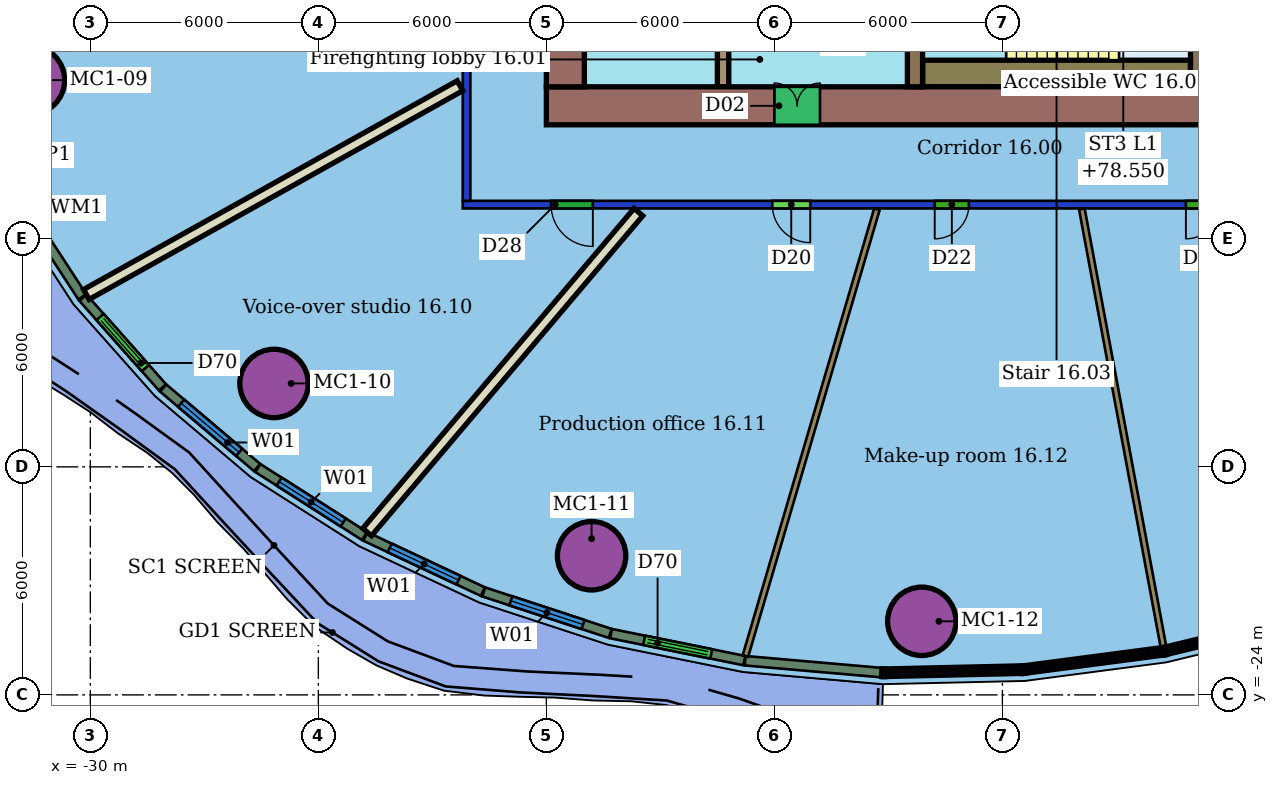
"""IFC4 building model, lengths in metres.
Left out: names, types, materials, properties, quantities, classifications, styles, units other than length and angle.
Written with IfcOpenShell. Run it as: python <this file> out.ifc"""

import sys

from ifc_helpers import new_model, si_unit, direction, frame, frame_2d, origin, origin_2d, place, context, subcontext, project, spatial, rectangle, hollow_circle, extrude, element, fill, save


model = new_model("IFC4")
c1 = context("Model", 3, precision=1e-05, world=origin(), true_north=direction((0.0, 1.0)))
c2 = subcontext(c1, "Body", "Model", "MODEL_VIEW")
j1 = project(units=[si_unit("LENGTHUNIT", "METRE"), si_unit("PLANEANGLEUNIT", "RADIAN")], contexts=[c1])
p1 = place(None, origin())
s1 = spatial("IfcSite", under=j1, at=p1, CompositionType="ELEMENT")
p2 = place(p1, origin())
s2 = spatial("IfcBuilding", under=s1, at=p2, CompositionType="ELEMENT")
p3 = place(p2, frame((0.0, 0.0, 76.7)))
s3 = spatial("IfcBuildingStorey", under=s2, at=p3, CompositionType="ELEMENT", Elevation=76.7)
for number, where, z_axis, x_axis in (
    (1, (-31.575, -7.824, 0.0), (0.0, 0.0, 1.0), (1.0, 0.0, 0.0)),
    (2, (-25.166, -15.805, 0.0), (0.0, 0.0, 1.0), (1.0, 0.0, 0.0)),
    (3, (-16.81, -20.339, 0.0), (0.0, 0.0, 1.0), (1.0, 0.0, 0.0)),
    (4, (-8.121, -22.064, 0.0), (0.0, 0.0, 1.0), (1.0, 0.0, 0.0)),
):
    element("IfcColumn", number, at=place(p3, frame(where, z_axis=z_axis, x_axis=x_axis)), inside=s3, PredefinedType="COLUMN", context=c2, shape_type="SweptSolid", body=[
        extrude(hollow_circle(Radius=0.9, WallThickness=0.06, at=origin_2d()), origin(), (0.0, 0.0, 1.0), 3.55),
    ])
p4 = place(p3, frame((8.2, -11.1, 0.0), z_axis=(0.0, 0.0, 1.0), x_axis=(-1.0, 0.0, 0.0)))
e5 = element("IfcWall", 5, at=p4, inside=s3, PredefinedType="PARTITIONING", context=c2, shape_type="SweptSolid", body=[
    extrude(rectangle(XDim=28.4, YDim=0.2, at=frame_2d((14.2, 0.0))), origin(), (0.0, 0.0, 1.0), 2.85),
])
p5 = place(p4, frame((24.977, 0.0, 0.0)))
e6 = element("IfcOpeningElement", 6, at=p5, cuts=e5, PredefinedType="OPENING", context=c2, shape_type="SweptSolid", body=[
    extrude(rectangle(XDim=1.1, YDim=2.1, at=frame_2d((0.55, 1.05))), frame((0.0, 0.11, 0.0), z_axis=(0.0, -1.0, 0.0), x_axis=(1.0, 0.0, 0.0)), (0.0, 0.0, 1.0), 0.22),
])
p6 = place(p4, frame((19.256, 0.0, 0.0)))
e7 = element("IfcOpeningElement", 7, at=p6, cuts=e5, PredefinedType="OPENING", context=c2, shape_type="SweptSolid", body=[
    extrude(rectangle(XDim=1.0, YDim=2.1, at=frame_2d((0.5, 1.05))), frame((0.0, 0.11, 0.0), z_axis=(0.0, -1.0, 0.0), x_axis=(1.0, 0.0, 0.0)), (0.0, 0.0, 1.0), 0.22),
])
p7 = place(p4, frame((15.081, 0.0, 0.0)))
e8 = element("IfcOpeningElement", 8, at=p7, cuts=e5, PredefinedType="OPENING", context=c2, shape_type="SweptSolid", body=[
    extrude(rectangle(XDim=0.9, YDim=2.1, at=frame_2d((0.45, 1.05))), frame((0.0, 0.11, 0.0), z_axis=(0.0, -1.0, 0.0), x_axis=(1.0, 0.0, 0.0)), (0.0, 0.0, 1.0), 0.22),
])
p8 = place(p4, frame((8.472, 0.0, 0.0)))
e9 = element("IfcOpeningElement", 9, at=p8, cuts=e5, PredefinedType="OPENING", context=c2, shape_type="SweptSolid", body=[
    extrude(rectangle(XDim=0.9, YDim=2.1, at=frame_2d((0.45, 1.05))), frame((0.0, 0.11, 0.0), z_axis=(0.0, -1.0, 0.0), x_axis=(1.0, 0.0, 0.0)), (0.0, 0.0, 1.0), 0.22),
])
p9 = place(p3, frame((-20.1, -11.0, 0.0), z_axis=(0.0, 0.0, 1.0), x_axis=(0.0, 1.0, 0.0)))
e10 = element("IfcWall", 10, at=p9, inside=s3, PredefinedType="PARTITIONING", context=c2, shape_type="SweptSolid", body=[
    extrude(rectangle(XDim=22.0, YDim=0.2, at=frame_2d((11.0, 0.0))), origin(), (0.0, 0.0, 1.0), 2.85),
])
p10 = place(p9, frame((18.191, 0.0, 0.0)))
e11 = element("IfcOpeningElement", 11, at=p10, cuts=e10, PredefinedType="OPENING", context=c2, shape_type="SweptSolid", body=[
    extrude(rectangle(XDim=0.9, YDim=2.1, at=frame_2d((0.45, 1.05))), frame((0.0, 0.11, 0.0), z_axis=(0.0, -1.0, 0.0), x_axis=(1.0, 0.0, 0.0)), (0.0, 0.0, 1.0), 0.22),
])
p11 = place(p9, frame((14.06, 0.0, 0.0)))
e12 = element("IfcOpeningElement", 12, at=p11, cuts=e10, PredefinedType="OPENING", context=c2, shape_type="SweptSolid", body=[
    extrude(rectangle(XDim=1.1, YDim=2.1, at=frame_2d((0.55, 1.05))), frame((0.0, 0.11, 0.0), z_axis=(0.0, -1.0, 0.0), x_axis=(1.0, 0.0, 0.0)), (0.0, 0.0, 1.0), 0.22),
])
p12 = place(p9, frame((9.116, 0.0, 0.0)))
e13 = element("IfcOpeningElement", 13, at=p12, cuts=e10, PredefinedType="OPENING", context=c2, shape_type="SweptSolid", body=[
    extrude(rectangle(XDim=1.2, YDim=2.1, at=frame_2d((0.6, 1.05))), frame((0.0, 0.11, 0.0), z_axis=(0.0, -1.0, 0.0), x_axis=(1.0, 0.0, 0.0)), (0.0, 0.0, 1.0), 0.22),
])
p13 = place(p9, frame((5.868, 0.0, 0.0)))
e14 = element("IfcOpeningElement", 14, at=p13, cuts=e10, PredefinedType="OPENING", context=c2, shape_type="SweptSolid", body=[
    extrude(rectangle(XDim=1.0, YDim=2.1, at=frame_2d((0.5, 1.05))), frame((0.0, 0.11, 0.0), z_axis=(0.0, -1.0, 0.0), x_axis=(1.0, 0.0, 0.0)), (0.0, 0.0, 1.0), 0.22),
])
p14 = place(p3, frame((-30.104, -13.463, 0.0), z_axis=(0.0, 0.0, 1.0), x_axis=(0.87304746241, 0.487635241117, 0.0)))
e15 = element("IfcWall", 15, at=p14, inside=s3, PredefinedType="PARTITIONING", context=c2, shape_type="SweptSolid", body=[
    extrude(rectangle(XDim=11.261, YDim=0.3, at=frame_2d((5.63, 0.0))), origin(), (0.0, 0.0, 1.0), 3.55),
])
p15 = place(p3, frame((-22.716, -19.716, 0.0), z_axis=(0.0, 0.0, 1.0), x_axis=(0.646701478122, 0.762743205931, 0.0)))
e16 = element("IfcWall", 16, at=p15, inside=s3, PredefinedType="PARTITIONING", context=c2, shape_type="SweptSolid", body=[
    extrude(rectangle(XDim=11.037, YDim=0.3, at=frame_2d((5.519, 0.0))), origin(), (0.0, 0.0, 1.0), 3.55),
])
p16 = place(p3, frame((-12.762, -22.976, 0.0), z_axis=(0.0, 0.0, 1.0), x_axis=(0.282322729793, 0.959319486012, 0.0)))
e17 = element("IfcWall", 17, at=p16, inside=s3, PredefinedType="PARTITIONING", context=c2, shape_type="SweptSolid", body=[
    extrude(rectangle(XDim=12.254, YDim=0.15, at=frame_2d((6.127, 0.0))), origin(), (0.0, 0.0, 1.0), 3.55),
])
p17 = place(p3, frame((-1.763, -22.726, 0.0), z_axis=(0.0, 0.0, 1.0), x_axis=(-0.183249988058, 0.98306634663, 0.0)))
e18 = element("IfcWall", 18, at=p17, inside=s3, PredefinedType="PARTITIONING", context=c2, shape_type="SweptSolid", body=[
    extrude(rectangle(XDim=11.711, YDim=0.15, at=frame_2d((5.855, 0.0))), origin(), (0.0, 0.0, 1.0), 3.55),
])
p18 = place(p3, frame((-31.871, -10.978, 0.0), z_axis=(0.0, 0.0, 1.0), x_axis=(0.545574882471, -0.838062078618, 0.0)))
e19 = element("IfcWall", 19, at=p18, inside=s3, PredefinedType="SOLIDWALL", context=c2, shape_type="SweptSolid", body=[
    extrude(rectangle(XDim=3.042, YDim=0.25, at=frame_2d((1.521, 0.0))), origin(), (0.0, 0.0, 1.0), 3.15),
])
p19 = place(p3, frame((-30.195, -13.549, 0.0), z_axis=(0.0, 0.0, 1.0), x_axis=(0.663940867432, -0.747785079119, 0.0)))
e20 = element("IfcWall", 20, at=p19, inside=s3, PredefinedType="SOLIDWALL", context=c2, shape_type="SweptSolid", body=[
    extrude(rectangle(XDim=3.154, YDim=0.25, at=frame_2d((1.577, 0.0))), origin(), (0.0, 0.0, 1.0), 3.15),
])
p20 = place(p19, frame((0.677, 0.0, 0.0)))
e21 = element("IfcOpeningElement", 21, at=p20, cuts=e20, PredefinedType="OPENING", context=c2, shape_type="SweptSolid", body=[
    extrude(rectangle(XDim=1.8, YDim=2.4, at=frame_2d((0.9, 1.2))), frame((0.0, 0.135, 0.0), z_axis=(0.0, -1.0, 0.0), x_axis=(1.0, 0.0, 0.0)), (0.0, 0.0, 1.0), 0.27),
])
p21 = place(p3, frame((-28.083, -15.925, 0.0), z_axis=(0.0, 0.0, 1.0), x_axis=(0.763314755693, -0.646026767047, 0.0)))
e22 = element("IfcWall", 22, at=p21, inside=s3, PredefinedType="SOLIDWALL", context=c2, shape_type="SweptSolid", body=[
    extrude(rectangle(XDim=3.237, YDim=0.25, at=frame_2d((1.618, 0.0))), origin(), (0.0, 0.0, 1.0), 3.15),
])
p22 = place(p21, frame((0.618, 0.0, 0.8)))
e23 = element("IfcOpeningElement", 23, at=p22, cuts=e22, PredefinedType="OPENING", context=c2, shape_type="SweptSolid", body=[
    extrude(rectangle(XDim=2.0, YDim=2.2, at=frame_2d((1.0, 1.1))), frame((0.0, 0.135, 0.0), z_axis=(0.0, -1.0, 0.0), x_axis=(1.0, 0.0, 0.0)), (0.0, 0.0, 1.0), 0.27),
])
p23 = place(p3, frame((-25.592, -18.031, 0.0), z_axis=(0.0, 0.0, 1.0), x_axis=(0.843428771265, -0.537241014632, 0.0)))
e24 = element("IfcWall", 24, at=p23, inside=s3, PredefinedType="SOLIDWALL", context=c2, shape_type="SweptSolid", body=[
    extrude(rectangle(XDim=3.327, YDim=0.25, at=frame_2d((1.664, 0.0))), origin(), (0.0, 0.0, 1.0), 3.15),
])
p24 = place(p23, frame((0.664, 0.0, 0.8)))
e25 = element("IfcOpeningElement", 25, at=p24, cuts=e24, PredefinedType="OPENING", context=c2, shape_type="SweptSolid", body=[
    extrude(rectangle(XDim=2.0, YDim=2.2, at=frame_2d((1.0, 1.1))), frame((0.0, 0.135, 0.0), z_axis=(0.0, -1.0, 0.0), x_axis=(1.0, 0.0, 0.0)), (0.0, 0.0, 1.0), 0.27),
])
p25 = place(p3, frame((-22.765, -19.83, 0.0), z_axis=(0.0, 0.0, 1.0), x_axis=(0.905237504744, -0.424905942538, 0.0)))
e26 = element("IfcWall", 26, at=p25, inside=s3, PredefinedType="SOLIDWALL", context=c2, shape_type="SweptSolid", body=[
    extrude(rectangle(XDim=3.418, YDim=0.25, at=frame_2d((1.709, 0.0))), origin(), (0.0, 0.0, 1.0), 3.15),
])
p26 = place(p25, frame((0.709, 0.0, 0.8)))
e27 = element("IfcOpeningElement", 27, at=p26, cuts=e26, PredefinedType="OPENING", context=c2, shape_type="SweptSolid", body=[
    extrude(rectangle(XDim=2.0, YDim=2.2, at=frame_2d((1.0, 1.1))), frame((0.0, 0.135, 0.0), z_axis=(0.0, -1.0, 0.0), x_axis=(1.0, 0.0, 0.0)), (0.0, 0.0, 1.0), 0.27),
])
p27 = place(p3, frame((-19.649, -21.291, 0.0), z_axis=(0.0, 0.0, 1.0), x_axis=(0.950294453708, -0.311352615617, 0.0)))
e28 = element("IfcWall", 28, at=p27, inside=s3, PredefinedType="SOLIDWALL", context=c2, shape_type="SweptSolid", body=[
    extrude(rectangle(XDim=3.503, YDim=0.25, at=frame_2d((1.752, 0.0))), origin(), (0.0, 0.0, 1.0), 3.15),
])
p28 = place(p27, frame((0.752, 0.0, 0.8)))
e29 = element("IfcOpeningElement", 29, at=p28, cuts=e28, PredefinedType="OPENING", context=c2, shape_type="SweptSolid", body=[
    extrude(rectangle(XDim=2.0, YDim=2.2, at=frame_2d((1.0, 1.1))), frame((0.0, 0.135, 0.0), z_axis=(0.0, -1.0, 0.0), x_axis=(1.0, 0.0, 0.0)), (0.0, 0.0, 1.0), 0.27),
])
p29 = place(p3, frame((-16.298, -22.388, 0.0), z_axis=(0.0, 0.0, 1.0), x_axis=(0.980121435031, -0.198398519635, 0.0)))
e30 = element("IfcWall", 30, at=p29, inside=s3, PredefinedType="SOLIDWALL", context=c2, shape_type="SweptSolid", body=[
    extrude(rectangle(XDim=3.578, YDim=0.25, at=frame_2d((1.789, 0.0))), origin(), (0.0, 0.0, 1.0), 3.15),
])
p30 = place(p29, frame((0.889, 0.0, 0.0)))
e31 = element("IfcOpeningElement", 31, at=p30, cuts=e30, PredefinedType="OPENING", context=c2, shape_type="SweptSolid", body=[
    extrude(rectangle(XDim=1.8, YDim=2.4, at=frame_2d((0.9, 1.2))), frame((0.0, 0.135, 0.0), z_axis=(0.0, -1.0, 0.0), x_axis=(1.0, 0.0, 0.0)), (0.0, 0.0, 1.0), 0.27),
])
p31 = place(p3, frame((-12.768, -23.101, 0.0), z_axis=(0.0, 0.0, 1.0), x_axis=(0.996218891736, -0.086878764662, 0.0)))
e32 = element("IfcWall", 32, at=p31, inside=s3, PredefinedType="SOLIDWALL", context=c2, shape_type="SweptSolid", body=[
    extrude(rectangle(XDim=3.594, YDim=0.25, at=frame_2d((1.797, 0.0))), origin(), (0.0, 0.0, 1.0), 3.15),
])
p32 = place(p3, frame((-18.0, -8.5, 0.0), z_axis=(0.0, 0.0, 1.0), x_axis=(1.0, 0.0, 0.0)))
e33 = element("IfcWall", 33, at=p32, inside=s3, PredefinedType="SHEAR", context=c2, shape_type="SweptSolid", body=[
    extrude(rectangle(XDim=24.0, YDim=1.0, at=frame_2d((12.0, 0.0))), origin(), (0.0, 0.0, 1.0), 3.4),
])
p33 = place(p32, frame((6.0, 0.0, 0.0)))
e34 = element("IfcOpeningElement", 34, at=p33, cuts=e33, PredefinedType="OPENING", context=c2, shape_type="SweptSolid", body=[
    extrude(rectangle(XDim=1.2, YDim=2.1, at=frame_2d((0.6, 1.05))), frame((0.0, 0.51, 0.0), z_axis=(0.0, -1.0, 0.0), x_axis=(1.0, 0.0, 0.0)), (0.0, 0.0, 1.0), 1.02),
])
p34 = place(p3, frame((-17.5, 8.0, 0.0), z_axis=(0.0, 0.0, 1.0), x_axis=(0.0, -1.0, 0.0)))
e35 = element("IfcWall", 35, at=p34, inside=s3, PredefinedType="SHEAR", context=c2, shape_type="SweptSolid", body=[
    extrude(rectangle(XDim=16.0, YDim=1.0, at=frame_2d((8.0, 0.0))), origin(), (0.0, 0.0, 1.0), 3.4),
])
p35 = place(p34, frame((11.9, 0.0, 0.0)))
e36 = element("IfcOpeningElement", 36, at=p35, cuts=e35, PredefinedType="OPENING", context=c2, shape_type="SweptSolid", body=[
    extrude(rectangle(XDim=1.2, YDim=2.1, at=frame_2d((0.6, 1.05))), frame((0.0, 0.51, 0.0), z_axis=(0.0, -1.0, 0.0), x_axis=(1.0, 0.0, 0.0)), (0.0, 0.0, 1.0), 1.02),
])
p36 = place(p34, frame((2.9, 0.0, 0.0)))
e37 = element("IfcOpeningElement", 37, at=p36, cuts=e35, PredefinedType="OPENING", context=c2, shape_type="SweptSolid", body=[
    extrude(rectangle(XDim=1.2, YDim=2.1, at=frame_2d((0.6, 1.05))), frame((0.0, 0.51, 0.0), z_axis=(0.0, -1.0, 0.0), x_axis=(1.0, 0.0, 0.0)), (0.0, 0.0, 1.0), 1.02),
])
p37 = place(p3, frame((-13.35, 8.0, 0.0), z_axis=(0.0, 0.0, 1.0), x_axis=(0.0, -1.0, 0.0)))
e38 = element("IfcWall", 38, at=p37, inside=s3, PredefinedType="SHEAR", context=c2, shape_type="SweptSolid", body=[
    extrude(rectangle(XDim=16.0, YDim=0.3, at=frame_2d((8.0, 0.0))), origin(), (0.0, 0.0, 1.0), 3.4),
])
p38 = place(p37, frame((7.25, 0.0, 0.0)))
e39 = element("IfcOpeningElement", 39, at=p38, cuts=e38, PredefinedType="OPENING", context=c2, shape_type="SweptSolid", body=[
    extrude(rectangle(XDim=1.5, YDim=2.1, at=frame_2d((0.75, 1.05))), frame((0.0, 0.16, 0.0), z_axis=(0.0, -1.0, 0.0), x_axis=(1.0, 0.0, 0.0)), (0.0, 0.0, 1.0), 0.32),
])
p39 = place(p3, frame((-8.3, -3.88, 0.0), z_axis=(0.0, 0.0, 1.0), x_axis=(0.0, -1.0, 0.0)))
e40 = element("IfcWall", 40, at=p39, inside=s3, PredefinedType="SHEAR", context=c2, shape_type="SweptSolid", body=[
    extrude(rectangle(XDim=4.12, YDim=0.4, at=frame_2d((2.06, 0.0))), origin(), (0.0, 0.0, 1.0), 3.4),
])
p40 = place(p39, frame((1.11, 0.0, 0.0)))
e41 = element("IfcOpeningElement", 41, at=p40, cuts=e40, PredefinedType="OPENING", context=c2, shape_type="SweptSolid", body=[
    extrude(rectangle(XDim=1.2, YDim=2.1, at=frame_2d((0.6, 1.05))), frame((0.0, 0.21, 0.0), z_axis=(0.0, -1.0, 0.0), x_axis=(1.0, 0.0, 0.0)), (0.0, 0.0, 1.0), 0.42),
])
p41 = place(p3, frame((-0.85, -3.88, 0.0), z_axis=(0.0, 0.0, 1.0), x_axis=(0.0, -1.0, 0.0)))
e42 = element("IfcWall", 42, at=p41, inside=s3, PredefinedType="SHEAR", context=c2, shape_type="SweptSolid", body=[
    extrude(rectangle(XDim=4.12, YDim=0.4, at=frame_2d((2.06, 0.0))), origin(), (0.0, 0.0, 1.0), 3.4),
])
p42 = place(p3, frame((-8.1, -7.65, 0.0), z_axis=(0.0, 0.0, 1.0), x_axis=(1.0, 0.0, 0.0)))
e43 = element("IfcWall", 43, at=p42, inside=s3, PredefinedType="SHEAR", context=c2, shape_type="SweptSolid", body=[
    extrude(rectangle(XDim=7.05, YDim=0.7, at=frame_2d((3.525, 0.0))), origin(), (0.0, 0.0, 1.0), 3.4),
])
p43 = place(p5, origin())
e44 = element("IfcDoor", 44, at=p43, inside=s3, OperationType="SINGLE_SWING_LEFT", PredefinedType="DOOR", context=c2, shape_type="SweptSolid", body=[
    extrude(rectangle(XDim=1.1, YDim=2.1, at=frame_2d((0.55, 1.05))), frame((0.0, 0.025, 0.0), z_axis=(0.0, -1.0, 0.0), x_axis=(1.0, 0.0, 0.0)), (0.0, 0.0, 1.0), 0.05),
])
fill(e6, e44)
p44 = place(p6, origin())
e45 = element("IfcDoor", 45, at=p44, inside=s3, OperationType="SINGLE_SWING_LEFT", PredefinedType="DOOR", context=c2, shape_type="SweptSolid", body=[
    extrude(rectangle(XDim=1.0, YDim=2.1, at=frame_2d((0.5, 1.05))), frame((0.0, 0.025, 0.0), z_axis=(0.0, -1.0, 0.0), x_axis=(1.0, 0.0, 0.0)), (0.0, 0.0, 1.0), 0.05),
])
fill(e7, e45)
p45 = place(p7, origin())
e46 = element("IfcDoor", 46, at=p45, inside=s3, OperationType="SINGLE_SWING_RIGHT", PredefinedType="DOOR", context=c2, shape_type="SweptSolid", body=[
    extrude(rectangle(XDim=0.9, YDim=2.1, at=frame_2d((0.45, 1.05))), frame((0.0, 0.025, 0.0), z_axis=(0.0, -1.0, 0.0), x_axis=(1.0, 0.0, 0.0)), (0.0, 0.0, 1.0), 0.05),
])
fill(e8, e46)
p46 = place(p8, origin())
e47 = element("IfcDoor", 47, at=p46, inside=s3, OperationType="SINGLE_SWING_RIGHT", PredefinedType="DOOR", context=c2, shape_type="SweptSolid", body=[
    extrude(rectangle(XDim=0.9, YDim=2.1, at=frame_2d((0.45, 1.05))), frame((0.0, 0.025, 0.0), z_axis=(0.0, -1.0, 0.0), x_axis=(1.0, 0.0, 0.0)), (0.0, 0.0, 1.0), 0.05),
])
fill(e9, e47)
p47 = place(p20, origin())
e48 = element("IfcDoor", 48, at=p47, inside=s3, OperationType="DOUBLE_DOOR_SLIDING", PredefinedType="DOOR", context=c2, shape_type="SweptSolid", body=[
    extrude(rectangle(XDim=1.8, YDim=2.4, at=frame_2d((0.9, 1.2))), frame((0.0, 0.025, 0.0), z_axis=(0.0, -1.0, 0.0), x_axis=(1.0, 0.0, 0.0)), (0.0, 0.0, 1.0), 0.05),
])
fill(e21, e48)
p48 = place(p22, origin())
e49 = element("IfcWindow", 49, at=p48, inside=s3, PartitioningType="SINGLE_PANEL", PredefinedType="WINDOW", context=c2, shape_type="SweptSolid", body=[
    extrude(rectangle(XDim=2.0, YDim=2.2, at=frame_2d((1.0, 1.1))), frame((0.0, 0.03, 0.0), z_axis=(0.0, -1.0, 0.0), x_axis=(1.0, 0.0, 0.0)), (0.0, 0.0, 1.0), 0.06),
])
fill(e23, e49)
p49 = place(p24, origin())
e50 = element("IfcWindow", 50, at=p49, inside=s3, PartitioningType="SINGLE_PANEL", PredefinedType="WINDOW", context=c2, shape_type="SweptSolid", body=[
    extrude(rectangle(XDim=2.0, YDim=2.2, at=frame_2d((1.0, 1.1))), frame((0.0, 0.03, 0.0), z_axis=(0.0, -1.0, 0.0), x_axis=(1.0, 0.0, 0.0)), (0.0, 0.0, 1.0), 0.06),
])
fill(e25, e50)
p50 = place(p26, origin())
e51 = element("IfcWindow", 51, at=p50, inside=s3, PartitioningType="SINGLE_PANEL", PredefinedType="WINDOW", context=c2, shape_type="SweptSolid", body=[
    extrude(rectangle(XDim=2.0, YDim=2.2, at=frame_2d((1.0, 1.1))), frame((0.0, 0.03, 0.0), z_axis=(0.0, -1.0, 0.0), x_axis=(1.0, 0.0, 0.0)), (0.0, 0.0, 1.0), 0.06),
])
fill(e27, e51)
p51 = place(p28, origin())
e52 = element("IfcWindow", 52, at=p51, inside=s3, PartitioningType="SINGLE_PANEL", PredefinedType="WINDOW", context=c2, shape_type="SweptSolid", body=[
    extrude(rectangle(XDim=2.0, YDim=2.2, at=frame_2d((1.0, 1.1))), frame((0.0, 0.03, 0.0), z_axis=(0.0, -1.0, 0.0), x_axis=(1.0, 0.0, 0.0)), (0.0, 0.0, 1.0), 0.06),
])
fill(e29, e52)
p52 = place(p30, origin())
e53 = element("IfcDoor", 53, at=p52, inside=s3, OperationType="DOUBLE_DOOR_SLIDING", PredefinedType="DOOR", context=c2, shape_type="SweptSolid", body=[
    extrude(rectangle(XDim=1.8, YDim=2.4, at=frame_2d((0.9, 1.2))), frame((0.0, 0.025, 0.0), z_axis=(0.0, -1.0, 0.0), x_axis=(1.0, 0.0, 0.0)), (0.0, 0.0, 1.0), 0.05),
])
fill(e31, e53)
p53 = place(p33, origin())
e54 = element("IfcDoor", 54, at=p53, inside=s3, OperationType="DOUBLE_DOOR_SINGLE_SWING", PredefinedType="NOTDEFINED", context=c2, shape_type="SweptSolid", body=[
    extrude(rectangle(XDim=1.2, YDim=2.1, at=frame_2d((0.6, 1.05))), frame((0.0, 0.025, 0.0), z_axis=(0.0, -1.0, 0.0), x_axis=(1.0, 0.0, 0.0)), (0.0, 0.0, 1.0), 0.05),
])
fill(e34, e54)
save(model, sys.argv[1])
